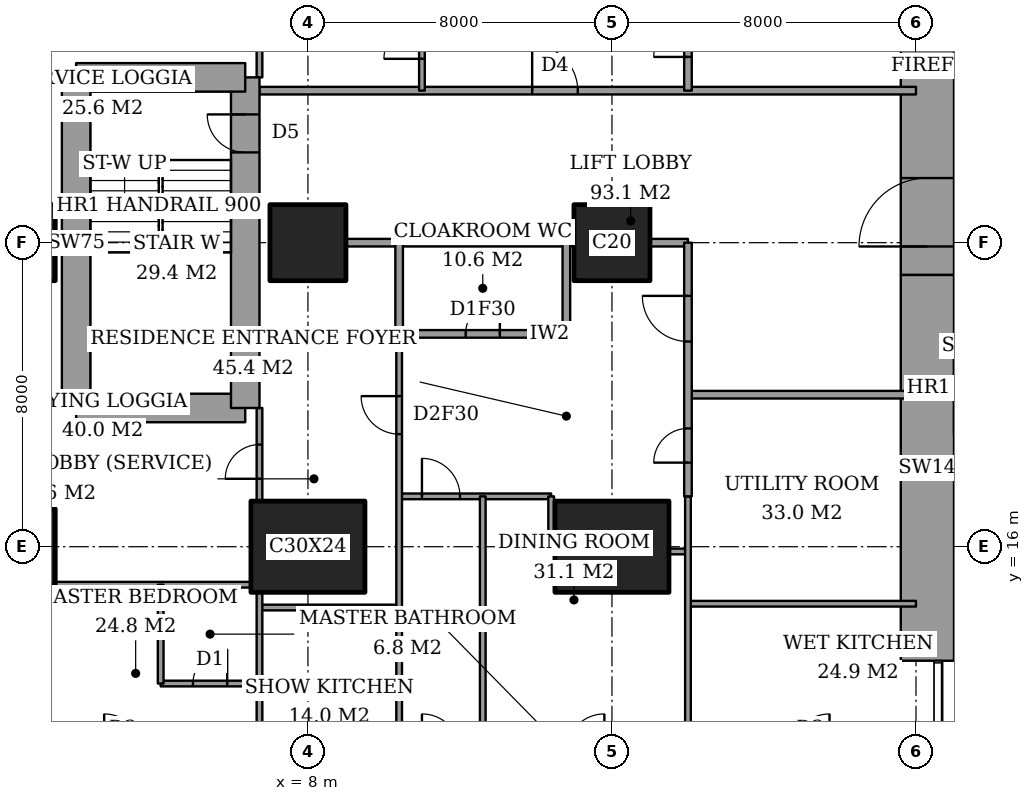
"""IFC4 building model, lengths in metres.
Left out: names, types, materials, properties, quantities, classifications, styles, units other than length and angle.
Written with IfcOpenShell. Run it as: python <this file> out.ifc"""

import sys

from ifc_helpers import new_model, si_unit, direction, frame, frame_2d, origin, origin_2d, place, context, subcontext, project, spatial, rectangle, extrude, element, fill, save


model = new_model("IFC4")
c1 = context("Model", 3, precision=1e-05, world=origin(), true_north=direction((0.0, 1.0)))
c2 = subcontext(c1, "Body", "Model", "MODEL_VIEW")
j1 = project(units=[si_unit("LENGTHUNIT", "METRE"), si_unit("PLANEANGLEUNIT", "RADIAN")], contexts=[c1])
p1 = place(None, origin())
s1 = spatial("IfcSite", under=j1, at=p1, CompositionType="ELEMENT")
p2 = place(p1, origin())
s2 = spatial("IfcBuilding", under=s1, at=p2, CompositionType="ELEMENT")
p3 = place(p2, frame((0.0, 0.0, 33.2)))
s3 = spatial("IfcBuildingStorey", under=s2, at=p3, CompositionType="ELEMENT", Elevation=33.2)
for number, where, z_axis, x_axis in (
    (1, (0.35, 16.0, 0.0), (0.0, 0.0, 1.0), (1.0, 0.0, 0.0)),
    (2, (0.35, 24.0, 0.0), (0.0, 0.0, 1.0), (1.0, 0.0, 0.0)),
):
    element("IfcColumn", number, at=place(p3, frame(where, z_axis=z_axis, x_axis=x_axis)), inside=s3, PredefinedType="COLUMN", context=c2, shape_type="SweptSolid", body=[
        extrude(rectangle(XDim=2.0, YDim=2.0, at=origin_2d()), origin(), (0.0, 0.0, 1.0), 3.6),
    ])
p4 = place(p3, frame((8.0, 16.0, 0.0), z_axis=(0.0, 0.0, 1.0), x_axis=(1.0, 0.0, 0.0)))
e3 = element("IfcColumn", 3, at=p4, inside=s3, PredefinedType="COLUMN", context=c2, shape_type="SweptSolid", body=[
    extrude(rectangle(XDim=3.0, YDim=2.4, at=origin_2d()), origin(), (0.0, 0.0, 1.0), 3.6),
])
p5 = place(p3, frame((8.0, 24.0, 0.0), z_axis=(0.0, 0.0, 1.0), x_axis=(1.0, 0.0, 0.0)))
e4 = element("IfcColumn", 4, at=p5, inside=s3, PredefinedType="COLUMN", context=c2, shape_type="SweptSolid", body=[
    extrude(rectangle(XDim=2.0, YDim=2.0, at=origin_2d()), origin(), (0.0, 0.0, 1.0), 3.6),
])
p6 = place(p3, frame((16.0, 16.0, 0.0), z_axis=(0.0, 0.0, 1.0), x_axis=(1.0, 0.0, 0.0)))
e5 = element("IfcColumn", 5, at=p6, inside=s3, PredefinedType="COLUMN", context=c2, shape_type="SweptSolid", body=[
    extrude(rectangle(XDim=3.0, YDim=2.4, at=origin_2d()), origin(), (0.0, 0.0, 1.0), 3.6),
])
p7 = place(p3, frame((16.0, 24.0, 0.0), z_axis=(0.0, 0.0, 1.0), x_axis=(1.0, 0.0, 0.0)))
e6 = element("IfcColumn", 6, at=p7, inside=s3, PredefinedType="COLUMN", context=c2, shape_type="SweptSolid", body=[
    extrude(rectangle(XDim=2.0, YDim=2.0, at=origin_2d()), origin(), (0.0, 0.0, 1.0), 3.6),
])
p8 = place(p3, frame((24.3, 13.0, 0.0), z_axis=(0.0, 0.0, 1.0), x_axis=(0.0, 1.0, 0.0)))
e7 = element("IfcWall", 7, at=p8, inside=s3, PredefinedType="SHEAR", context=c2, shape_type="SweptSolid", body=[
    extrude(rectangle(XDim=10.15, YDim=1.4, at=frame_2d((5.075, 0.0))), origin(), (0.0, 0.0, 1.0), 3.6),
])
p9 = place(p3, frame((24.3, 23.15, 0.0), z_axis=(0.0, 0.0, 1.0), x_axis=(0.0, 1.0, 0.0)))
e8 = element("IfcWall", 8, at=p9, inside=s3, PredefinedType="SHEAR", context=c2, shape_type="SweptSolid", body=[
    extrude(rectangle(XDim=11.85, YDim=1.4, at=frame_2d((5.925, 0.0))), origin(), (0.0, 0.0, 1.0), 3.6),
])
p10 = place(p9, frame((0.75, 0.0, 0.0)))
e9 = element("IfcOpeningElement", 9, at=p10, cuts=e8, PredefinedType="OPENING", context=c2, shape_type="SweptSolid", body=[
    extrude(rectangle(XDim=1.8, YDim=2.4, at=frame_2d((0.9, 1.2))), frame((0.0, 0.71, 0.0), z_axis=(0.0, -1.0, 0.0), x_axis=(1.0, 0.0, 0.0)), (0.0, 0.0, 1.0), 1.42),
])
p11 = place(p3, frame((1.9, 19.65, 0.0), z_axis=(0.0, 0.0, 1.0), x_axis=(1.0, 0.0, 0.0)))
e10 = element("IfcWall", 10, at=p11, inside=s3, PredefinedType="SHEAR", context=c2, shape_type="SweptSolid", body=[
    extrude(rectangle(XDim=4.45, YDim=0.75, at=frame_2d((2.225, 0.0))), origin(), (0.0, 0.0, 1.0), 3.6),
])
p12 = place(p3, frame((6.35, 19.65, 0.0), z_axis=(0.0, 0.0, 1.0), x_axis=(0.0, 1.0, 0.0)))
e11 = element("IfcWall", 11, at=p12, inside=s3, PredefinedType="SHEAR", context=c2, shape_type="SweptSolid", body=[
    extrude(rectangle(XDim=8.7, YDim=0.75, at=frame_2d((4.35, 0.0))), origin(), (0.0, 0.0, 1.0), 3.6),
])
p13 = place(p12, frame((6.725, 0.0, 0.0)))
e12 = element("IfcOpeningElement", 12, at=p13, cuts=e11, PredefinedType="OPENING", context=c2, shape_type="SweptSolid", body=[
    extrude(rectangle(XDim=1.0, YDim=2.1, at=frame_2d((0.5, 1.05))), frame((0.0, 0.385, 0.0), z_axis=(0.0, -1.0, 0.0), x_axis=(1.0, 0.0, 0.0)), (0.0, 0.0, 1.0), 0.77),
])
p14 = place(p3, frame((6.35, 28.35, 0.0), z_axis=(0.0, 0.0, 1.0), x_axis=(-1.0, 0.0, 0.0)))
e13 = element("IfcWall", 13, at=p14, inside=s3, PredefinedType="SHEAR", context=c2, shape_type="SweptSolid", body=[
    extrude(rectangle(XDim=4.45, YDim=0.75, at=frame_2d((2.225, 0.0))), origin(), (0.0, 0.0, 1.0), 3.6),
])
p15 = place(p3, frame((1.9, 28.35, 0.0), z_axis=(0.0, 0.0, 1.0), x_axis=(0.0, -1.0, 0.0)))
e14 = element("IfcWall", 14, at=p15, inside=s3, PredefinedType="SHEAR", context=c2, shape_type="SweptSolid", body=[
    extrude(rectangle(XDim=8.7, YDim=0.75, at=frame_2d((4.35, 0.0))), origin(), (0.0, 0.0, 1.0), 3.6),
])
p16 = place(p3, frame((4.125, 12.4, 0.0), z_axis=(0.0, 0.0, 1.0), x_axis=(1.0, 0.0, 0.0)))
e15 = element("IfcWall", 15, at=p16, inside=s3, PredefinedType="PARTITIONING", context=c2, shape_type="SweptSolid", body=[
    extrude(rectangle(XDim=2.6, YDim=0.15, at=frame_2d((1.3, 0.0))), origin(), (0.0, 0.0, 1.0), 3.35),
])
p17 = place(p16, frame((0.85, 0.0, 0.0)))
e16 = element("IfcOpeningElement", 16, at=p17, cuts=e15, PredefinedType="OPENING", context=c2, shape_type="SweptSolid", body=[
    extrude(rectangle(XDim=0.9, YDim=2.1, at=frame_2d((0.45, 1.05))), frame((0.0, 0.085, 0.0), z_axis=(0.0, -1.0, 0.0), x_axis=(1.0, 0.0, 0.0)), (0.0, 0.0, 1.0), 0.17),
])
p18 = place(p3, frame((6.725, 14.4, 0.0), z_axis=(0.0, 0.0, 1.0), x_axis=(1.0, 0.0, 0.0)))
e17 = element("IfcWall", 17, at=p18, inside=s3, PredefinedType="PARTITIONING", context=c2, shape_type="SweptSolid", body=[
    extrude(rectangle(XDim=3.675, YDim=0.15, at=frame_2d((1.837, 0.0))), origin(), (0.0, 0.0, 1.0), 3.35),
])
p19 = place(p3, frame((18.0, 14.5, 0.0), z_axis=(0.0, 0.0, 1.0), x_axis=(1.0, 0.0, 0.0)))
e18 = element("IfcWall", 18, at=p19, inside=s3, PredefinedType="PARTITIONING", context=c2, shape_type="SweptSolid", body=[
    extrude(rectangle(XDim=6.0, YDim=0.15, at=frame_2d((3.0, 0.0))), origin(), (0.0, 0.0, 1.0), 3.35),
])
p20 = place(p3, frame((1.35, 15.0, 0.0), z_axis=(0.0, 0.0, 1.0), x_axis=(1.0, 0.0, 0.0)))
e19 = element("IfcWall", 19, at=p20, inside=s3, PredefinedType="PARTITIONING", context=c2, shape_type="SweptSolid", body=[
    extrude(rectangle(XDim=5.15, YDim=0.15, at=frame_2d((2.575, 0.0))), origin(), (0.0, 0.0, 1.0), 3.35),
])
p21 = place(p3, frame((17.5, 15.875, 0.0), z_axis=(0.0, 0.0, 1.0), x_axis=(1.0, 0.0, 0.0)))
e20 = element("IfcWall", 20, at=p21, inside=s3, PredefinedType="PARTITIONING", context=c2, shape_type="SweptSolid", body=[
    extrude(rectangle(XDim=0.5, YDim=0.15, at=frame_2d((0.25, 0.0))), origin(), (0.0, 0.0, 1.0), 2.634),
])
p22 = place(p3, frame((10.4, 17.325, 0.0), z_axis=(0.0, 0.0, 1.0), x_axis=(1.0, 0.0, 0.0)))
e21 = element("IfcWall", 21, at=p22, inside=s3, PredefinedType="PARTITIONING", context=c2, shape_type="SweptSolid", body=[
    extrude(rectangle(XDim=4.0, YDim=0.15, at=frame_2d((2.0, 0.0))), origin(), (0.0, 0.0, 1.0), 3.35),
])
p23 = place(p22, frame((0.6, 0.0, 0.0)))
e22 = element("IfcOpeningElement", 22, at=p23, cuts=e21, PredefinedType="OPENING", context=c2, shape_type="SweptSolid", body=[
    extrude(rectangle(XDim=1.0, YDim=2.1, at=frame_2d((0.5, 1.05))), frame((0.0, 0.085, 0.0), z_axis=(0.0, -1.0, 0.0), x_axis=(1.0, 0.0, 0.0)), (0.0, 0.0, 1.0), 0.17),
])
p24 = place(p3, frame((18.0, 20.0, 0.0), z_axis=(0.0, 0.0, 1.0), x_axis=(1.0, 0.0, 0.0)))
e23 = element("IfcWall", 23, at=p24, inside=s3, PredefinedType="PARTITIONING", context=c2, shape_type="SweptSolid", body=[
    extrude(rectangle(XDim=6.0, YDim=0.2, at=frame_2d((3.0, 0.0))), origin(), (0.0, 0.0, 1.0), 3.35),
])
p25 = place(p3, frame((10.4, 21.6, 0.0), z_axis=(0.0, 0.0, 1.0), x_axis=(1.0, 0.0, 0.0)))
e24 = element("IfcWall", 24, at=p25, inside=s3, PredefinedType="PARTITIONING", context=c2, shape_type="SweptSolid", body=[
    extrude(rectangle(XDim=4.4, YDim=0.2, at=frame_2d((2.2, 0.0))), origin(), (0.0, 0.0, 1.0), 3.35),
])
p26 = place(p25, frame((1.75, 0.0, 0.0)))
e25 = element("IfcOpeningElement", 25, at=p26, cuts=e24, PredefinedType="OPENING", context=c2, shape_type="SweptSolid", body=[
    extrude(rectangle(XDim=0.9, YDim=2.1, at=frame_2d((0.45, 1.05))), frame((0.0, 0.11, 0.0), z_axis=(0.0, -1.0, 0.0), x_axis=(1.0, 0.0, 0.0)), (0.0, 0.0, 1.0), 0.22),
])
p27 = place(p3, frame((9.0, 24.0, 0.0), z_axis=(0.0, 0.0, 1.0), x_axis=(1.0, 0.0, 0.0)))
e26 = element("IfcWall", 26, at=p27, inside=s3, PredefinedType="PARTITIONING", context=c2, shape_type="SweptSolid", body=[
    extrude(rectangle(XDim=6.0, YDim=0.2, at=frame_2d((3.0, 0.0))), origin(), (0.0, 0.0, 1.0), 3.35),
])
p28 = place(p3, frame((17.0, 24.0, 0.0), z_axis=(0.0, 0.0, 1.0), x_axis=(1.0, 0.0, 0.0)))
e27 = element("IfcWall", 27, at=p28, inside=s3, PredefinedType="PARTITIONING", context=c2, shape_type="SweptSolid", body=[
    extrude(rectangle(XDim=1.0, YDim=0.2, at=frame_2d((0.5, 0.0))), origin(), (0.0, 0.0, 1.0), 3.35),
])
p29 = place(p3, frame((6.725, 28.0, 0.0), z_axis=(0.0, 0.0, 1.0), x_axis=(1.0, 0.0, 0.0)))
e28 = element("IfcWall", 28, at=p29, inside=s3, PredefinedType="PARTITIONING", context=c2, shape_type="SweptSolid", body=[
    extrude(rectangle(XDim=17.275, YDim=0.2, at=frame_2d((8.637, 0.0))), origin(), (0.0, 0.0, 1.0), 3.35),
])
p30 = place(p29, frame((7.175, 0.0, 0.0)))
e29 = element("IfcOpeningElement", 29, at=p30, cuts=e28, PredefinedType="OPENING", context=c2, shape_type="SweptSolid", body=[
    extrude(rectangle(XDim=1.2, YDim=2.4, at=frame_2d((0.6, 1.2))), frame((0.0, 0.11, 0.0), z_axis=(0.0, -1.0, 0.0), x_axis=(1.0, 0.0, 0.0)), (0.0, 0.0, 1.0), 0.22),
])
p31 = place(p3, frame((4.125, 12.4, 0.0), z_axis=(0.0, 0.0, 1.0), x_axis=(0.0, 1.0, 0.0)))
e30 = element("IfcWall", 30, at=p31, inside=s3, PredefinedType="PARTITIONING", context=c2, shape_type="SweptSolid", body=[
    extrude(rectangle(XDim=2.6, YDim=0.15, at=frame_2d((1.3, 0.0))), origin(), (0.0, 0.0, 1.0), 3.35),
])
p32 = place(p3, frame((6.725, 10.6, 0.0), z_axis=(0.0, 0.0, 1.0), x_axis=(0.0, 1.0, 0.0)))
e31 = element("IfcWall", 31, at=p32, inside=s3, PredefinedType="PARTITIONING", context=c2, shape_type="SweptSolid", body=[
    extrude(rectangle(XDim=4.2, YDim=0.15, at=frame_2d((2.1, 0.0))), origin(), (0.0, 0.0, 1.0), 3.35),
])
p33 = place(p3, frame((6.725, 17.2, 0.0), z_axis=(0.0, 0.0, 1.0), x_axis=(0.0, 1.0, 0.0)))
e32 = element("IfcWall", 32, at=p33, inside=s3, PredefinedType="PARTITIONING", context=c2, shape_type="SweptSolid", body=[
    extrude(rectangle(XDim=2.45, YDim=0.15, at=frame_2d((1.225, 0.0))), origin(), (0.0, 0.0, 1.0), 3.35),
])
p34 = place(p33, frame((0.587, 0.0, 0.0)))
e33 = element("IfcOpeningElement", 33, at=p34, cuts=e32, PredefinedType="OPENING", context=c2, shape_type="SweptSolid", body=[
    extrude(rectangle(XDim=0.9, YDim=2.1, at=frame_2d((0.45, 1.05))), frame((0.0, 0.085, 0.0), z_axis=(0.0, -1.0, 0.0), x_axis=(1.0, 0.0, 0.0)), (0.0, 0.0, 1.0), 0.17),
])
p35 = place(p3, frame((6.725, 28.35, 0.0), z_axis=(0.0, 0.0, 1.0), x_axis=(0.0, 1.0, 0.0)))
e34 = element("IfcWall", 34, at=p35, inside=s3, PredefinedType="PARTITIONING", context=c2, shape_type="SweptSolid", body=[
    extrude(rectangle(XDim=2.45, YDim=0.15, at=frame_2d((1.225, 0.0))), origin(), (0.0, 0.0, 1.0), 3.35),
])
p36 = place(p35, frame((0.962, 0.0, 0.0)))
e35 = element("IfcOpeningElement", 35, at=p36, cuts=e34, PredefinedType="OPENING", context=c2, shape_type="SweptSolid", body=[
    extrude(rectangle(XDim=0.9, YDim=2.1, at=frame_2d((0.45, 1.05))), frame((0.0, 0.085, 0.0), z_axis=(0.0, -1.0, 0.0), x_axis=(1.0, 0.0, 0.0)), (0.0, 0.0, 1.0), 0.17),
])
p37 = place(p3, frame((10.4, 21.6, 0.0), z_axis=(0.0, 0.0, 1.0), x_axis=(0.0, 1.0, 0.0)))
e36 = element("IfcWall", 36, at=p37, inside=s3, PredefinedType="PARTITIONING", context=c2, shape_type="SweptSolid", body=[
    extrude(rectangle(XDim=2.4, YDim=0.2, at=frame_2d((1.2, 0.0))), origin(), (0.0, 0.0, 1.0), 3.35),
])
p38 = place(p3, frame((10.4, 10.6, 0.0), z_axis=(0.0, 0.0, 1.0), x_axis=(0.0, 1.0, 0.0)))
e37 = element("IfcWall", 37, at=p38, inside=s3, PredefinedType="PARTITIONING", context=c2, shape_type="SweptSolid", body=[
    extrude(rectangle(XDim=11.0, YDim=0.15, at=frame_2d((5.5, 0.0))), origin(), (0.0, 0.0, 1.0), 3.35),
])
p39 = place(p38, frame((8.363, 0.0, 0.0)))
e38 = element("IfcOpeningElement", 38, at=p39, cuts=e37, PredefinedType="OPENING", context=c2, shape_type="SweptSolid", body=[
    extrude(rectangle(XDim=1.0, YDim=2.1, at=frame_2d((0.5, 1.05))), frame((0.0, 0.085, 0.0), z_axis=(0.0, -1.0, 0.0), x_axis=(1.0, 0.0, 0.0)), (0.0, 0.0, 1.0), 0.17),
])
p40 = place(p3, frame((11.0, 28.0, 0.0), z_axis=(0.0, 0.0, 1.0), x_axis=(0.0, 1.0, 0.0)))
e39 = element("IfcWall", 39, at=p40, inside=s3, PredefinedType="PARTITIONING", context=c2, shape_type="SweptSolid", body=[
    extrude(rectangle(XDim=9.0, YDim=0.15, at=frame_2d((4.5, 0.0))), origin(), (0.0, 0.0, 1.0), 3.35),
])
p41 = place(p40, frame((0.837, 0.0, 0.0)))
e40 = element("IfcOpeningElement", 40, at=p41, cuts=e39, PredefinedType="OPENING", context=c2, shape_type="SweptSolid", body=[
    extrude(rectangle(XDim=1.0, YDim=2.1, at=frame_2d((0.5, 1.05))), frame((0.0, 0.085, 0.0), z_axis=(0.0, -1.0, 0.0), x_axis=(1.0, 0.0, 0.0)), (0.0, 0.0, 1.0), 0.17),
])
p42 = place(p3, frame((12.6, 10.6, 0.0), z_axis=(0.0, 0.0, 1.0), x_axis=(0.0, 1.0, 0.0)))
e41 = element("IfcWall", 41, at=p42, inside=s3, PredefinedType="PARTITIONING", context=c2, shape_type="SweptSolid", body=[
    extrude(rectangle(XDim=6.725, YDim=0.15, at=frame_2d((3.362, 0.0))), origin(), (0.0, 0.0, 1.0), 3.35),
])
p43 = place(p3, frame((14.4, 15.875, 0.0), z_axis=(0.0, 0.0, 1.0), x_axis=(0.0, 1.0, 0.0)))
e42 = element("IfcWall", 42, at=p43, inside=s3, PredefinedType="PARTITIONING", context=c2, shape_type="SweptSolid", body=[
    extrude(rectangle(XDim=1.45, YDim=0.15, at=frame_2d((0.725, 0.0))), origin(), (0.0, 0.0, 1.0), 3.35),
])
p44 = place(p3, frame((14.8, 21.6, 0.0), z_axis=(0.0, 0.0, 1.0), x_axis=(0.0, 1.0, 0.0)))
e43 = element("IfcWall", 43, at=p44, inside=s3, PredefinedType="PARTITIONING", context=c2, shape_type="SweptSolid", body=[
    extrude(rectangle(XDim=2.4, YDim=0.2, at=frame_2d((1.2, 0.0))), origin(), (0.0, 0.0, 1.0), 3.35),
])
p45 = place(p3, frame((18.0, 17.325, 0.0), z_axis=(0.0, 0.0, 1.0), x_axis=(0.0, 1.0, 0.0)))
e44 = element("IfcWall", 44, at=p45, inside=s3, PredefinedType="PARTITIONING", context=c2, shape_type="SweptSolid", body=[
    extrude(rectangle(XDim=6.675, YDim=0.2, at=frame_2d((3.337, 0.0))), origin(), (0.0, 0.0, 1.0), 3.35),
])
p46 = place(p45, frame((4.075, 0.0, 0.0)))
e45 = element("IfcOpeningElement", 45, at=p46, cuts=e44, PredefinedType="OPENING", context=c2, shape_type="SweptSolid", body=[
    extrude(rectangle(XDim=1.2, YDim=2.4, at=frame_2d((0.6, 1.2))), frame((0.0, 0.11, 0.0), z_axis=(0.0, -1.0, 0.0), x_axis=(1.0, 0.0, 0.0)), (0.0, 0.0, 1.0), 0.22),
])
p47 = place(p45, frame((0.887, 0.0, 0.0)))
e46 = element("IfcOpeningElement", 46, at=p47, cuts=e44, PredefinedType="OPENING", context=c2, shape_type="SweptSolid", body=[
    extrude(rectangle(XDim=0.9, YDim=2.1, at=frame_2d((0.45, 1.05))), frame((0.0, 0.11, 0.0), z_axis=(0.0, -1.0, 0.0), x_axis=(1.0, 0.0, 0.0)), (0.0, 0.0, 1.0), 0.22),
])
p48 = place(p3, frame((18.0, 28.0, 0.0), z_axis=(0.0, 0.0, 1.0), x_axis=(0.0, 1.0, 0.0)))
e47 = element("IfcWall", 47, at=p48, inside=s3, PredefinedType="PARTITIONING", context=c2, shape_type="SweptSolid", body=[
    extrude(rectangle(XDim=5.0, YDim=0.2, at=frame_2d((2.5, 0.0))), origin(), (0.0, 0.0, 1.0), 3.35),
])
p49 = place(p48, frame((0.887, 0.0, 0.0)))
e48 = element("IfcOpeningElement", 48, at=p49, cuts=e47, PredefinedType="OPENING", context=c2, shape_type="SweptSolid", body=[
    extrude(rectangle(XDim=0.9, YDim=2.1, at=frame_2d((0.45, 1.05))), frame((0.0, 0.11, 0.0), z_axis=(0.0, -1.0, 0.0), x_axis=(1.0, 0.0, 0.0)), (0.0, 0.0, 1.0), 0.22),
])
p50 = place(p3, frame((18.0, 10.6, 0.0), z_axis=(0.0, 0.0, 1.0), x_axis=(0.0, 1.0, 0.0)))
e49 = element("IfcWall", 49, at=p50, inside=s3, PredefinedType="PARTITIONING", context=c2, shape_type="SweptSolid", body=[
    extrude(rectangle(XDim=6.725, YDim=0.15, at=frame_2d((3.362, 0.0))), origin(), (0.0, 0.0, 1.0), 3.35),
])
p51 = place(p17, origin())
e50 = element("IfcDoor", 50, at=p51, inside=s3, OperationType="SINGLE_SWING_LEFT", PredefinedType="DOOR", context=c2, shape_type="SweptSolid", body=[
    extrude(rectangle(XDim=0.9, YDim=2.1, at=frame_2d((0.45, 1.05))), frame((0.0, 0.025, 0.0), z_axis=(0.0, -1.0, 0.0), x_axis=(1.0, 0.0, 0.0)), (0.0, 0.0, 1.0), 0.05),
])
fill(e16, e50)
p52 = place(p34, origin())
e51 = element("IfcDoor", 51, at=p52, inside=s3, OperationType="SINGLE_SWING_RIGHT", PredefinedType="DOOR", context=c2, shape_type="SweptSolid", body=[
    extrude(rectangle(XDim=0.9, YDim=2.1, at=frame_2d((0.45, 1.05))), frame((0.0, 0.025, 0.0), z_axis=(0.0, -1.0, 0.0), x_axis=(1.0, 0.0, 0.0)), (0.0, 0.0, 1.0), 0.05),
])
fill(e33, e51)
p53 = place(p39, origin())
e52 = element("IfcDoor", 52, at=p53, inside=s3, OperationType="SINGLE_SWING_LEFT", PredefinedType="DOOR", context=c2, shape_type="SweptSolid", body=[
    extrude(rectangle(XDim=1.0, YDim=2.1, at=frame_2d((0.5, 1.05))), frame((0.0, 0.025, 0.0), z_axis=(0.0, -1.0, 0.0), x_axis=(1.0, 0.0, 0.0)), (0.0, 0.0, 1.0), 0.05),
])
fill(e38, e52)
p54 = place(p26, origin())
e53 = element("IfcDoor", 53, at=p54, inside=s3, OperationType="SINGLE_SWING_LEFT", PredefinedType="DOOR", context=c2, shape_type="SweptSolid", body=[
    extrude(rectangle(XDim=0.9, YDim=2.1, at=frame_2d((0.45, 1.05))), frame((0.0, 0.025, 0.0), z_axis=(0.0, -1.0, 0.0), x_axis=(1.0, 0.0, 0.0)), (0.0, 0.0, 1.0), 0.05),
])
fill(e25, e53)
p55 = place(p46, origin())
e54 = element("IfcDoor", 54, at=p55, inside=s3, OperationType="SINGLE_SWING_LEFT", PredefinedType="DOOR", context=c2, shape_type="SweptSolid", body=[
    extrude(rectangle(XDim=1.2, YDim=2.4, at=frame_2d((0.6, 1.2))), frame((0.0, 0.025, 0.0), z_axis=(0.0, -1.0, 0.0), x_axis=(1.0, 0.0, 0.0)), (0.0, 0.0, 1.0), 0.05),
])
fill(e45, e54)
p56 = place(p23, origin())
e55 = element("IfcDoor", 55, at=p56, inside=s3, OperationType="SINGLE_SWING_RIGHT", PredefinedType="DOOR", context=c2, shape_type="SweptSolid", body=[
    extrude(rectangle(XDim=1.0, YDim=2.1, at=frame_2d((0.5, 1.05))), frame((0.0, 0.025, 0.0), z_axis=(0.0, -1.0, 0.0), x_axis=(1.0, 0.0, 0.0)), (0.0, 0.0, 1.0), 0.05),
])
fill(e22, e55)
p57 = place(p47, origin())
e56 = element("IfcDoor", 56, at=p57, inside=s3, OperationType="SINGLE_SWING_RIGHT", PredefinedType="DOOR", context=c2, shape_type="SweptSolid", body=[
    extrude(rectangle(XDim=0.9, YDim=2.1, at=frame_2d((0.45, 1.05))), frame((0.0, 0.025, 0.0), z_axis=(0.0, -1.0, 0.0), x_axis=(1.0, 0.0, 0.0)), (0.0, 0.0, 1.0), 0.05),
])
fill(e46, e56)
p58 = place(p41, origin())
e57 = element("IfcDoor", 57, at=p58, inside=s3, OperationType="SINGLE_SWING_RIGHT", PredefinedType="DOOR", context=c2, shape_type="SweptSolid", body=[
    extrude(rectangle(XDim=1.0, YDim=2.1, at=frame_2d((0.5, 1.05))), frame((0.0, 0.025, 0.0), z_axis=(0.0, -1.0, 0.0), x_axis=(1.0, 0.0, 0.0)), (0.0, 0.0, 1.0), 0.05),
])
fill(e40, e57)
p59 = place(p30, origin())
e58 = element("IfcDoor", 58, at=p59, inside=s3, OperationType="SINGLE_SWING_RIGHT", PredefinedType="DOOR", context=c2, shape_type="SweptSolid", body=[
    extrude(rectangle(XDim=1.2, YDim=2.4, at=frame_2d((0.6, 1.2))), frame((0.0, 0.025, 0.0), z_axis=(0.0, -1.0, 0.0), x_axis=(1.0, 0.0, 0.0)), (0.0, 0.0, 1.0), 0.05),
])
fill(e29, e58)
p60 = place(p49, origin())
e59 = element("IfcDoor", 59, at=p60, inside=s3, OperationType="SINGLE_SWING_RIGHT", PredefinedType="DOOR", context=c2, shape_type="SweptSolid", body=[
    extrude(rectangle(XDim=0.9, YDim=2.1, at=frame_2d((0.45, 1.05))), frame((0.0, 0.025, 0.0), z_axis=(0.0, -1.0, 0.0), x_axis=(1.0, 0.0, 0.0)), (0.0, 0.0, 1.0), 0.05),
])
fill(e48, e59)
p61 = place(p10, origin())
e60 = element("IfcDoor", 60, at=p61, inside=s3, OperationType="DOUBLE_DOOR_DOUBLE_SWING", PredefinedType="DOOR", context=c2, shape_type="SweptSolid", body=[
    extrude(rectangle(XDim=1.8, YDim=2.4, at=frame_2d((0.9, 1.2))), frame((0.0, 0.025, 0.0), z_axis=(0.0, -1.0, 0.0), x_axis=(1.0, 0.0, 0.0)), (0.0, 0.0, 1.0), 0.05),
])
fill(e9, e60)
p62 = place(p13, origin())
e61 = element("IfcDoor", 61, at=p62, inside=s3, OperationType="SINGLE_SWING_LEFT", PredefinedType="DOOR", context=c2, shape_type="SweptSolid", body=[
    extrude(rectangle(XDim=1.0, YDim=2.1, at=frame_2d((0.5, 1.05))), frame((0.0, 0.025, 0.0), z_axis=(0.0, -1.0, 0.0), x_axis=(1.0, 0.0, 0.0)), (0.0, 0.0, 1.0), 0.05),
])
fill(e12, e61)
save(model, sys.argv[1])
